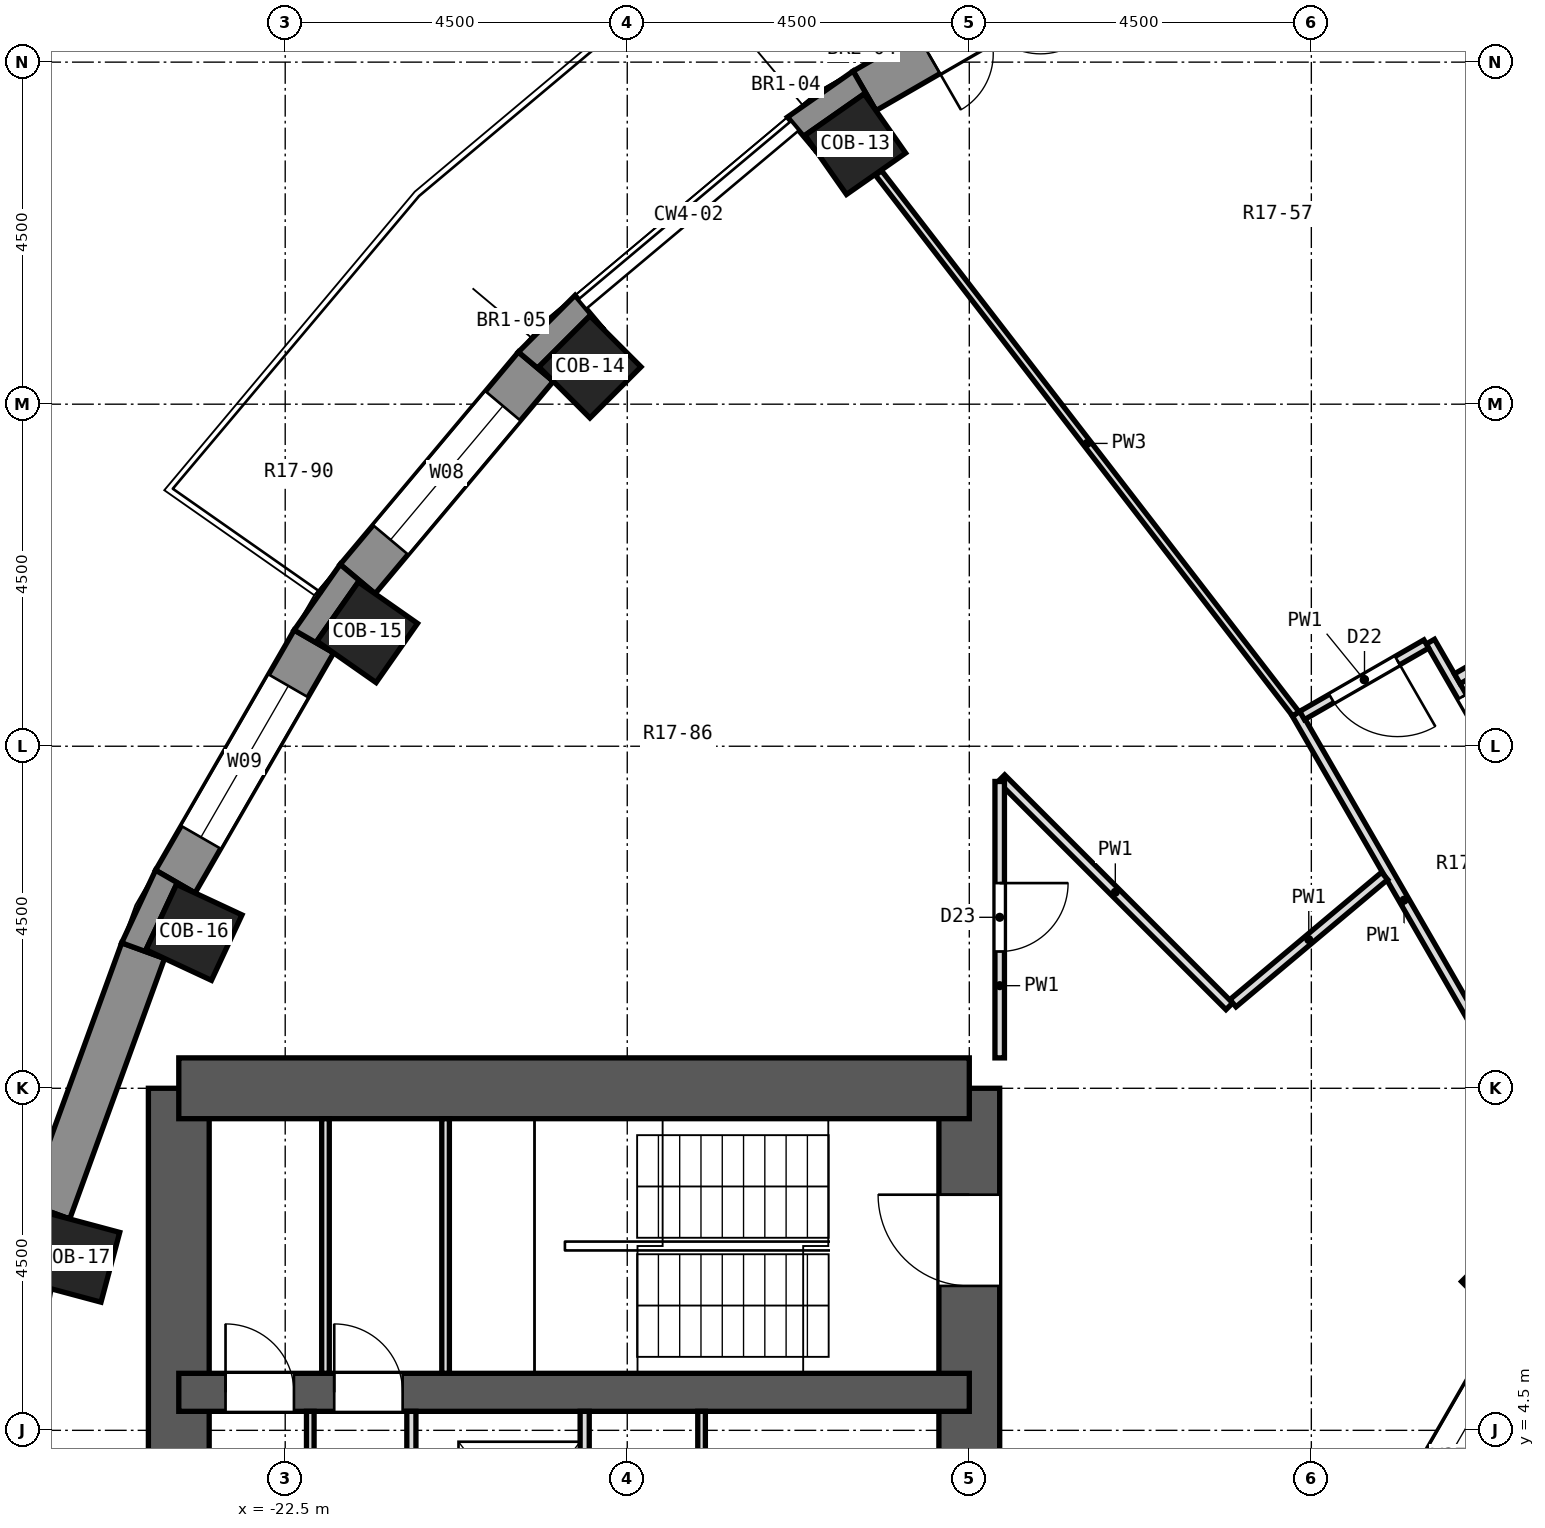
"""IFC4 building model, lengths in metres.
Left out: names, types, materials, properties, quantities, classifications, styles, units other than length and angle.
Written with IfcOpenShell. Run it as: python <this file> out.ifc"""

import sys

from ifc_helpers import new_model, si_unit, direction, frame, frame_2d, origin, origin_2d, place, context, subcontext, project, spatial, polyline, rectangle, outline, extrude, element, fill, save


model = new_model("IFC4")
c1 = context("Model", 3, precision=1e-05, world=origin(), true_north=direction((0.0, 1.0)))
c2 = subcontext(c1, "Body", "Model", "MODEL_VIEW")
j1 = project(units=[si_unit("LENGTHUNIT", "METRE"), si_unit("PLANEANGLEUNIT", "RADIAN")], contexts=[c1])
p1 = place(None, origin())
s1 = spatial("IfcSite", under=j1, at=p1, CompositionType="ELEMENT")
p2 = place(p1, origin())
s2 = spatial("IfcBuilding", under=s1, at=p2, CompositionType="ELEMENT")
p3 = place(p2, frame((0.0, 0.0, 91.9)))
s3 = spatial("IfcBuildingStorey", under=s2, at=p3, CompositionType="ELEMENT", Elevation=91.9)
for number, where, z_axis, x_axis in (
    (1, (-14.999, 21.421, 0.0), (0.0, 0.0, 1.0), (-0.574, 0.819, 0.0)),
    (2, (-18.491, 18.491, 0.0), (0.0, 0.0, 1.0), (-0.707, 0.707, 0.0)),
    (3, (-21.421, 14.999, 0.0), (0.0, 0.0, 1.0), (-0.819, 0.574, 0.0)),
    (4, (-23.7, 11.052, 0.0), (0.0, 0.0, 1.0), (-0.906, 0.423, 0.0)),
    (5, (-25.259, 6.768, 0.0), (0.0, 0.0, 1.0), (-0.966, 0.259, 0.0)),
):
    element("IfcColumn", number, at=place(p3, frame(where, z_axis=z_axis, x_axis=x_axis)), inside=s3, PredefinedType="COLUMN", context=c2, shape_type="SweptSolid", body=[
        extrude(rectangle(XDim=0.95, YDim=0.95, at=origin_2d()), origin(), (0.0, 0.0, 1.0), 3.3),
    ])
p4 = place(p3, frame((-6.458, 6.458, 0.0), z_axis=(0.0, 0.0, 1.0), x_axis=(-0.707106781187, 0.707106781187, 0.0)))
e6 = element("IfcColumn", 6, at=p4, inside=s3, PredefinedType="COLUMN", context=c2, shape_type="SweptSolid", body=[
    extrude(rectangle(XDim=0.8, YDim=0.8, at=origin_2d()), origin(), (0.0, 0.0, 1.0), 3.3),
])
p5 = place(p3, frame((-13.5, -9.0, 0.0), z_axis=(0.0, 0.0, 1.0), x_axis=(0.0, 1.0, 0.0)))
e7 = element("IfcWall", 7, at=p5, inside=s3, PredefinedType="SHEAR", context=c2, shape_type="SweptSolid", body=[
    extrude(rectangle(XDim=18.0, YDim=0.8, at=frame_2d((9.0, 0.0))), origin(), (0.0, 0.0, 1.0), 3.3),
])
p6 = place(p5, frame((15.4, 0.0, 0.0)))
e8 = element("IfcOpeningElement", 8, at=p6, cuts=e7, PredefinedType="OPENING", context=c2, shape_type="SweptSolid", body=[
    extrude(rectangle(XDim=1.2, YDim=2.1, at=frame_2d((0.6, 1.05))), frame((0.0, 0.412, 0.0), z_axis=(0.0, -1.0, 0.0), x_axis=(1.0, 0.0, 0.0)), (0.0, 0.0, 1.0), 0.824),
])
p7 = place(p5, frame((1.4, 0.0, 0.0)))
e9 = element("IfcOpeningElement", 9, at=p7, cuts=e7, PredefinedType="OPENING", context=c2, shape_type="SweptSolid", body=[
    extrude(rectangle(XDim=1.2, YDim=2.1, at=frame_2d((0.6, 1.05))), frame((0.0, 0.412, 0.0), z_axis=(0.0, -1.0, 0.0), x_axis=(1.0, 0.0, 0.0)), (0.0, 0.0, 1.0), 0.824),
])
p8 = place(p5, frame((7.5, 0.0, 0.0)))
e10 = element("IfcOpeningElement", 10, at=p8, cuts=e7, PredefinedType="OPENING", context=c2, shape_type="SweptSolid", body=[
    extrude(rectangle(XDim=3.0, YDim=2.4, at=frame_2d((1.5, 1.2))), frame((0.0, 0.412, 0.0), z_axis=(0.0, -1.0, 0.0), x_axis=(1.0, 0.0, 0.0)), (0.0, 0.0, 1.0), 0.824),
])
p9 = place(p3, frame((-23.9, -9.0, 0.0), z_axis=(0.0, 0.0, 1.0), x_axis=(0.0, 1.0, 0.0)))
e11 = element("IfcWall", 11, at=p9, inside=s3, PredefinedType="SHEAR", context=c2, shape_type="SweptSolid", body=[
    extrude(rectangle(XDim=18.0, YDim=0.8, at=frame_2d((9.0, 0.0))), origin(), (0.0, 0.0, 1.0), 3.3),
])
p10 = place(p3, frame((-13.5, 9.0, 0.0), z_axis=(0.0, 0.0, 1.0), x_axis=(-1.0, 0.0, 0.0)))
e12 = element("IfcWall", 12, at=p10, inside=s3, PredefinedType="SHEAR", context=c2, shape_type="SweptSolid", body=[
    extrude(rectangle(XDim=10.4, YDim=0.8, at=frame_2d((5.2, 0.0))), origin(), (0.0, 0.0, 1.0), 3.3),
])
p11 = place(p3, frame((-13.5, 5.0, 0.0), z_axis=(0.0, 0.0, 1.0), x_axis=(-1.0, 0.0, 0.0)))
e13 = element("IfcWall", 13, at=p11, inside=s3, PredefinedType="SHEAR", context=c2, shape_type="SweptSolid", body=[
    extrude(rectangle(XDim=10.4, YDim=0.5, at=frame_2d((5.2, 0.0))), origin(), (0.0, 0.0, 1.0), 3.3),
])
p12 = place(p11, frame((7.455, 0.0, 0.0)))
e14 = element("IfcOpeningElement", 14, at=p12, cuts=e13, PredefinedType="OPENING", context=c2, shape_type="SweptSolid", body=[
    extrude(rectangle(XDim=0.9, YDim=2.1, at=frame_2d((0.45, 1.05))), frame((0.0, 0.262, 0.0), z_axis=(0.0, -1.0, 0.0), x_axis=(1.0, 0.0, 0.0)), (0.0, 0.0, 1.0), 0.524),
])
p13 = place(p11, frame((8.885, 0.0, 0.0)))
e15 = element("IfcOpeningElement", 15, at=p13, cuts=e13, PredefinedType="OPENING", context=c2, shape_type="SweptSolid", body=[
    extrude(rectangle(XDim=0.9, YDim=2.1, at=frame_2d((0.45, 1.05))), frame((0.0, 0.262, 0.0), z_axis=(0.0, -1.0, 0.0), x_axis=(1.0, 0.0, 0.0)), (0.0, 0.0, 1.0), 0.524),
])
p14 = place(p3, frame((-11.719, 23.946, 0.0), z_axis=(0.0, 0.0, 1.0), x_axis=(-0.866051847062, -0.499954196102, 0.0)))
e16 = element("IfcWall", 16, at=p14, inside=s3, PredefinedType="SOLIDWALL", context=c2, shape_type="SweptSolid", body=[
    extrude(rectangle(XDim=3.648, YDim=0.6, at=frame_2d((1.824, 0.0))), origin(), (0.0, 0.0, 1.0), 2.8),
])
p15 = place(p14, frame((0.974, 0.0, 0.0)))
e17 = element("IfcOpeningElement", 17, at=p15, cuts=e16, PredefinedType="OPENING", context=c2, shape_type="SweptSolid", body=[
    extrude(rectangle(XDim=1.7, YDim=2.4, at=frame_2d((0.85, 1.2))), frame((0.0, 0.312, 0.0), z_axis=(0.0, -1.0, 0.0), x_axis=(1.0, 0.0, 0.0)), (0.0, 0.0, 1.0), 0.624),
])
p16 = place(p3, frame((-19.202, 18.494, 0.0), z_axis=(0.0, 0.0, 1.0), x_axis=(-0.642774476932, -0.766055462616, 0.0)))
e18 = element("IfcWall", 18, at=p16, inside=s3, PredefinedType="SOLIDWALL", context=c2, shape_type="SweptSolid", body=[
    extrude(rectangle(XDim=3.648, YDim=0.6, at=frame_2d((1.824, 0.0))), origin(), (0.0, 0.0, 1.0), 2.8),
])
p17 = place(p16, frame((0.674, 0.0, 0.9)))
e19 = element("IfcOpeningElement", 19, at=p17, cuts=e18, PredefinedType="OPENING", context=c2, shape_type="SweptSolid", body=[
    extrude(rectangle(XDim=2.3, YDim=1.8, at=frame_2d((1.15, 0.9))), frame((0.0, 0.312, 0.0), z_axis=(0.0, -1.0, 0.0), x_axis=(1.0, 0.0, 0.0)), (0.0, 0.0, 1.0), 0.624),
])
p18 = place(p3, frame((-22.122, 14.878, 0.0), z_axis=(0.0, 0.0, 1.0), x_axis=(-0.499954196102, -0.866051847062, 0.0)))
e20 = element("IfcWall", 20, at=p18, inside=s3, PredefinedType="SOLIDWALL", context=c2, shape_type="SweptSolid", body=[
    extrude(rectangle(XDim=3.648, YDim=0.6, at=frame_2d((1.824, 0.0))), origin(), (0.0, 0.0, 1.0), 2.8),
])
p19 = place(p18, frame((0.674, 0.0, 0.9)))
e21 = element("IfcOpeningElement", 21, at=p19, cuts=e20, PredefinedType="OPENING", context=c2, shape_type="SweptSolid", body=[
    extrude(rectangle(XDim=2.3, YDim=1.8, at=frame_2d((1.15, 0.9))), frame((0.0, 0.312, 0.0), z_axis=(0.0, -1.0, 0.0), x_axis=(1.0, 0.0, 0.0)), (0.0, 0.0, 1.0), 0.624),
])
p20 = place(p3, frame((-24.369, 10.811, 0.0), z_axis=(0.0, 0.0, 1.0), x_axis=(-0.341990236633, -0.939703505393, 0.0)))
e22 = element("IfcWall", 22, at=p20, inside=s3, PredefinedType="SOLIDWALL", context=c2, shape_type="SweptSolid", body=[
    extrude(rectangle(XDim=3.648, YDim=0.6, at=frame_2d((1.824, 0.0))), origin(), (0.0, 0.0, 1.0), 2.8),
])
p21 = place(p3, origin())
e23 = element("IfcWall", 23, at=p21, inside=s3, PredefinedType="SOLIDWALL", context=c2, shape_type="SweptSolid", body=[
    extrude(outline(polyline([(-15.892, 21.777), (-15.506, 21.317), (-15.661, 21.538), (-14.882, 22.083), (-14.728, 21.862), (-15.028, 22.382), (-15.892, 21.777)])), origin(), (0.0, 0.0, 1.0), 2.8),
])
p22 = place(p3, origin())
e24 = element("IfcWall", 24, at=p22, inside=s3, PredefinedType="SOLIDWALL", context=c2, shape_type="SweptSolid", body=[
    extrude(outline(polyline([(-18.686, 19.432), (-19.432, 18.686), (-18.972, 18.301), (-19.163, 18.491), (-18.491, 19.163), (-18.301, 18.972), (-18.686, 19.432)])), origin(), (0.0, 0.0, 1.0), 2.8),
])
p23 = place(p3, origin())
e25 = element("IfcWall", 25, at=p23, inside=s3, PredefinedType="SOLIDWALL", context=c2, shape_type="SweptSolid", body=[
    extrude(outline(polyline([(-22.382, 15.028), (-21.862, 14.728), (-22.083, 14.882), (-21.538, 15.661), (-21.317, 15.506), (-21.777, 15.892), (-22.382, 15.028)])), origin(), (0.0, 0.0, 1.0), 2.8),
])
p24 = place(p3, origin())
e26 = element("IfcWall", 26, at=p24, inside=s3, PredefinedType="SOLIDWALL", context=c2, shape_type="SweptSolid", body=[
    extrude(outline(polyline([(-24.651, 10.913), (-24.087, 10.708), (-24.331, 10.822), (-23.93, 11.683), (-23.686, 11.569), (-24.206, 11.869), (-24.651, 10.913)])), origin(), (0.0, 0.0, 1.0), 2.8),
])
p25 = place(p3, origin())
e27 = element("IfcWall", 27, at=p25, inside=s3, PredefinedType="SOLIDWALL", context=c2, shape_type="SweptSolid", body=[
    extrude(outline(polyline([(-25.899, 7.486), (-26.172, 6.467), (-25.581, 6.363), (-25.841, 6.432), (-25.595, 7.35), (-25.335, 7.28), (-25.899, 7.486)])), origin(), (0.0, 0.0, 1.0), 2.8),
])
p26 = place(p3, frame((-6.251, 5.773, 0.0), z_axis=(0.0, 0.0, 1.0), x_axis=(-0.499964958637, -0.86604563398, 0.0)))
e28 = element("IfcWall", 28, at=p26, inside=s3, PredefinedType="SOLIDWALL", context=c2, shape_type="SweptSolid", body=[
    extrude(rectangle(XDim=3.747, YDim=0.6, at=frame_2d((1.874, 0.0))), origin(), (0.0, 0.0, 1.0), 2.8),
])
p27 = place(p26, frame((0.674, 0.0, 0.9)))
e29 = element("IfcOpeningElement", 29, at=p27, cuts=e28, PredefinedType="OPENING", context=c2, shape_type="SweptSolid", body=[
    extrude(rectangle(XDim=2.4, YDim=1.8, at=frame_2d((1.2, 0.9))), frame((0.0, 0.312, 0.0), z_axis=(0.0, -1.0, 0.0), x_axis=(1.0, 0.0, 0.0)), (0.0, 0.0, 1.0), 0.624),
])
p28 = place(p3, frame((-9.197, 13.93, 0.0), z_axis=(0.0, 0.0, 1.0), x_axis=(0.499811918813, -0.86613396528, 0.0)))
e30 = element("IfcWall", 30, at=p28, inside=s3, PredefinedType="PARTITIONING", context=c2, shape_type="SweptSolid", body=[
    extrude(rectangle(XDim=5.67, YDim=0.125, at=frame_2d((2.835, 0.0))), origin(), (0.0, 0.0, 1.0), 2.8),
])
p29 = place(p3, frame((-7.434, 14.876, 0.0), z_axis=(0.0, 0.0, 1.0), x_axis=(0.499750096908, -0.866169637335, 0.0)))
e31 = element("IfcWall", 31, at=p29, inside=s3, PredefinedType="PARTITIONING", context=c2, shape_type="SweptSolid", body=[
    extrude(rectangle(XDim=5.607, YDim=0.125, at=frame_2d((2.803, 0.0))), origin(), (0.0, 0.0, 1.0), 2.8),
])
p30 = place(p29, frame((0.837, 0.0, 0.0)))
e32 = element("IfcOpeningElement", 32, at=p30, cuts=e31, PredefinedType="OPENING", context=c2, shape_type="SweptSolid", body=[
    extrude(rectangle(XDim=1.0, YDim=2.1, at=frame_2d((0.5, 1.05))), frame((0.0, 0.074, 0.0), z_axis=(0.0, -1.0, 0.0), x_axis=(1.0, 0.0, 0.0)), (0.0, 0.0, 1.0), 0.149),
])
p31 = place(p3, frame((-14.694, 21.042, 0.0), z_axis=(0.0, 0.0, 1.0), x_axis=(0.610804913832, -0.79178112963, 0.0)))
e33 = element("IfcWall", 33, at=p31, inside=s3, PredefinedType="PARTITIONING", context=c2, shape_type="SweptSolid", body=[
    extrude(rectangle(XDim=8.989, YDim=0.1, at=frame_2d((4.494, 0.0))), origin(), (0.0, 0.0, 1.0), 2.8),
])
p32 = place(p3, frame((-13.079, 13.079, 0.0), z_axis=(0.0, 0.0, 1.0), x_axis=(0.707106781187, -0.707106781187, 0.0)))
e34 = element("IfcWall", 34, at=p32, inside=s3, PredefinedType="PARTITIONING", context=c2, shape_type="SweptSolid", body=[
    extrude(rectangle(XDim=4.242, YDim=0.125, at=frame_2d((2.121, 0.0))), origin(), (0.0, 0.0, 1.0), 2.8),
])
p33 = place(p3, frame((-9.122, 13.904, 0.0), z_axis=(0.0, 0.0, 1.0), x_axis=(0.866620759959, 0.498967392128, 0.0)))
e35 = element("IfcWall", 35, at=p33, inside=s3, PredefinedType="PARTITIONING", context=c2, shape_type="SweptSolid", body=[
    extrude(rectangle(XDim=1.885, YDim=0.125, at=frame_2d((0.943, 0.0))), origin(), (0.0, 0.0, 1.0), 2.8),
])
p34 = place(p33, frame((0.448, 0.0, 0.0)))
e36 = element("IfcOpeningElement", 36, at=p34, cuts=e35, PredefinedType="OPENING", context=c2, shape_type="SweptSolid", body=[
    extrude(rectangle(XDim=1.0, YDim=2.1, at=frame_2d((0.5, 1.05))), frame((0.0, 0.074, 0.0), z_axis=(0.0, -1.0, 0.0), x_axis=(1.0, 0.0, 0.0)), (0.0, 0.0, 1.0), 0.149),
])
p35 = place(p3, frame((-7.08, 14.387, 0.0), z_axis=(0.0, 0.0, 1.0), x_axis=(0.865957178428, 0.500118151169, 0.0)))
e37 = element("IfcWall", 37, at=p35, inside=s3, PredefinedType="PARTITIONING", context=c2, shape_type="SweptSolid", body=[
    extrude(rectangle(XDim=3.24, YDim=0.15, at=frame_2d((1.62, 0.0))), origin(), (0.0, 0.0, 1.0), 2.8),
])
p36 = place(p3, frame((-10.031, 10.119, 0.0), z_axis=(0.0, 0.0, 1.0), x_axis=(0.766096242005, 0.642725873126, 0.0)))
e38 = element("IfcWall", 38, at=p36, inside=s3, PredefinedType="PARTITIONING", context=c2, shape_type="SweptSolid", body=[
    extrude(rectangle(XDim=2.604, YDim=0.125, at=frame_2d((1.302, 0.0))), origin(), (0.0, 0.0, 1.0), 2.8),
])
p37 = place(p3, frame((-13.1, 9.4, 0.0), z_axis=(0.0, 0.0, 1.0), x_axis=(0.0, 1.0, 0.0)))
e39 = element("IfcWall", 39, at=p37, inside=s3, PredefinedType="PARTITIONING", context=c2, shape_type="SweptSolid", body=[
    extrude(rectangle(XDim=3.637, YDim=0.125, at=frame_2d((1.818, 0.0))), origin(), (0.0, 0.0, 1.0), 2.8),
])
p38 = place(p37, frame((1.399, 0.0, 0.0)))
e40 = element("IfcOpeningElement", 40, at=p38, cuts=e39, PredefinedType="OPENING", context=c2, shape_type="SweptSolid", body=[
    extrude(rectangle(XDim=0.9, YDim=2.1, at=frame_2d((0.45, 1.05))), frame((0.0, 0.074, 0.0), z_axis=(0.0, -1.0, 0.0), x_axis=(1.0, 0.0, 0.0)), (0.0, 0.0, 1.0), 0.149),
])
p39 = place(p3, frame((-17.022, 2.25, 0.0), z_axis=(0.0, 0.0, 1.0), x_axis=(0.0, 1.0, 0.0)))
e41 = element("IfcWall", 41, at=p39, inside=s3, PredefinedType="PARTITIONING", context=c2, shape_type="SweptSolid", body=[
    extrude(rectangle(XDim=2.5, YDim=0.1, at=frame_2d((1.25, 0.0))), origin(), (0.0, 0.0, 1.0), 2.8),
])
for number, where, z_axis, x_axis in (
    (42, (-18.56, 2.25, 0.0), (0.0, 0.0, 1.0), (0.0, 1.0, 0.0)),
    (43, (-20.84, 2.25, 0.0), (0.0, 0.0, 1.0), (0.0, 1.0, 0.0)),
):
    element("IfcWall", number, at=place(p3, frame(where, z_axis=z_axis, x_axis=x_axis)), inside=s3, PredefinedType="PARTITIONING", context=c2, shape_type="SweptSolid", body=[
        extrude(rectangle(XDim=2.5, YDim=0.12, at=frame_2d((1.25, 0.0))), origin(), (0.0, 0.0, 1.0), 2.8),
    ])
p40 = place(p3, frame((-22.17, 2.25, 0.0), z_axis=(0.0, 0.0, 1.0), x_axis=(0.0, 1.0, 0.0)))
e44 = element("IfcWall", 44, at=p40, inside=s3, PredefinedType="PARTITIONING", context=c2, shape_type="SweptSolid", body=[
    extrude(rectangle(XDim=2.5, YDim=0.1, at=frame_2d((1.25, 0.0))), origin(), (0.0, 0.0, 1.0), 2.8),
])
for number, where, z_axis, x_axis in (
    (45, (-20.39, 5.25, 0.0), (0.0, 0.0, 1.0), (0.0, 1.0, 0.0)),
    (46, (-21.97, 5.25, 0.0), (0.0, 0.0, 1.0), (0.0, 1.0, 0.0)),
):
    element("IfcWall", number, at=place(p3, frame(where, z_axis=z_axis, x_axis=x_axis)), inside=s3, PredefinedType="PARTITIONING", context=c2, shape_type="SweptSolid", body=[
        extrude(rectangle(XDim=3.35, YDim=0.1, at=frame_2d((1.675, 0.0))), origin(), (0.0, 0.0, 1.0), 2.8),
    ])
p41 = place(p15, origin())
e47 = element("IfcDoor", 47, at=p41, inside=s3, OperationType="DOUBLE_DOOR_SINGLE_SWING", PredefinedType="DOOR", context=c2, shape_type="SweptSolid", body=[
    extrude(rectangle(XDim=1.7, YDim=2.4, at=frame_2d((0.85, 1.2))), frame((0.0, 0.125, 0.0), z_axis=(0.0, -1.0, 0.0), x_axis=(1.0, 0.0, 0.0)), (0.0, 0.0, 1.0), 0.05),
])
fill(e17, e47)
p42 = place(p17, origin())
e48 = element("IfcWindow", 48, at=p42, inside=s3, PartitioningType="SINGLE_PANEL", PredefinedType="WINDOW", context=c2, shape_type="SweptSolid", body=[
    extrude(rectangle(XDim=2.3, YDim=1.8, at=frame_2d((1.15, 0.9))), frame((0.0, 0.18, 0.0), z_axis=(0.0, -1.0, 0.0), x_axis=(1.0, 0.0, 0.0)), (0.0, 0.0, 1.0), 0.06),
])
fill(e19, e48)
p43 = place(p19, origin())
e49 = element("IfcWindow", 49, at=p43, inside=s3, PartitioningType="SINGLE_PANEL", PredefinedType="WINDOW", context=c2, shape_type="SweptSolid", body=[
    extrude(rectangle(XDim=2.3, YDim=1.8, at=frame_2d((1.15, 0.9))), frame((0.0, 0.18, 0.0), z_axis=(0.0, -1.0, 0.0), x_axis=(1.0, 0.0, 0.0)), (0.0, 0.0, 1.0), 0.06),
])
fill(e21, e49)
p44 = place(p27, origin())
e50 = element("IfcWindow", 50, at=p44, inside=s3, PartitioningType="SINGLE_PANEL", PredefinedType="WINDOW", context=c2, shape_type="SweptSolid", body=[
    extrude(rectangle(XDim=2.4, YDim=1.8, at=frame_2d((1.2, 0.9))), frame((0.0, -0.12, 0.0), z_axis=(0.0, -1.0, 0.0), x_axis=(1.0, 0.0, 0.0)), (0.0, 0.0, 1.0), 0.06),
])
fill(e29, e50)
p45 = place(p30, origin())
e51 = element("IfcDoor", 51, at=p45, inside=s3, OperationType="SINGLE_SWING_LEFT", PredefinedType="DOOR", context=c2, shape_type="SweptSolid", body=[
    extrude(rectangle(XDim=1.0, YDim=2.1, at=frame_2d((0.5, 1.05))), frame((0.0, 0.025, 0.0), z_axis=(0.0, -1.0, 0.0), x_axis=(1.0, 0.0, 0.0)), (0.0, 0.0, 1.0), 0.05),
])
fill(e32, e51)
p46 = place(p34, frame((1.0, 0.0, 0.0), z_axis=(0.0, 0.0, 1.0), x_axis=(-1.0, 0.0, 0.0)))
e52 = element("IfcDoor", 52, at=p46, inside=s3, OperationType="SINGLE_SWING_LEFT", PredefinedType="DOOR", context=c2, shape_type="SweptSolid", body=[
    extrude(rectangle(XDim=1.0, YDim=2.1, at=frame_2d((0.5, 1.05))), frame((0.0, 0.025, 0.0), z_axis=(0.0, -1.0, 0.0), x_axis=(1.0, 0.0, 0.0)), (0.0, 0.0, 1.0), 0.05),
])
fill(e36, e52)
p47 = place(p38, frame((0.9, 0.0, 0.0), z_axis=(0.0, 0.0, 1.0), x_axis=(-1.0, 0.0, 0.0)))
e53 = element("IfcDoor", 53, at=p47, inside=s3, OperationType="SINGLE_SWING_LEFT", PredefinedType="DOOR", context=c2, shape_type="SweptSolid", body=[
    extrude(rectangle(XDim=0.9, YDim=2.1, at=frame_2d((0.45, 1.05))), frame((0.0, 0.025, 0.0), z_axis=(0.0, -1.0, 0.0), x_axis=(1.0, 0.0, 0.0)), (0.0, 0.0, 1.0), 0.05),
])
fill(e40, e53)
p48 = place(p12, frame((0.9, 0.0, 0.0), z_axis=(0.0, 0.0, 1.0), x_axis=(-1.0, 0.0, 0.0)))
e54 = element("IfcDoor", 54, at=p48, inside=s3, OperationType="SINGLE_SWING_LEFT", PredefinedType="DOOR", context=c2, shape_type="SweptSolid", body=[
    extrude(rectangle(XDim=0.9, YDim=2.1, at=frame_2d((0.45, 1.05))), frame((0.0, 0.025, 0.0), z_axis=(0.0, -1.0, 0.0), x_axis=(1.0, 0.0, 0.0)), (0.0, 0.0, 1.0), 0.05),
])
fill(e14, e54)
p49 = place(p13, frame((0.9, 0.0, 0.0), z_axis=(0.0, 0.0, 1.0), x_axis=(-1.0, 0.0, 0.0)))
e55 = element("IfcDoor", 55, at=p49, inside=s3, OperationType="SINGLE_SWING_LEFT", PredefinedType="DOOR", context=c2, shape_type="SweptSolid", body=[
    extrude(rectangle(XDim=0.9, YDim=2.1, at=frame_2d((0.45, 1.05))), frame((0.0, 0.025, 0.0), z_axis=(0.0, -1.0, 0.0), x_axis=(1.0, 0.0, 0.0)), (0.0, 0.0, 1.0), 0.05),
])
fill(e15, e55)
p50 = place(p6, origin())
e56 = element("IfcDoor", 56, at=p50, inside=s3, OperationType="SINGLE_SWING_RIGHT", PredefinedType="DOOR", context=c2, shape_type="SweptSolid", body=[
    extrude(rectangle(XDim=1.2, YDim=2.1, at=frame_2d((0.6, 1.05))), frame((0.0, 0.025, 0.0), z_axis=(0.0, -1.0, 0.0), x_axis=(1.0, 0.0, 0.0)), (0.0, 0.0, 1.0), 0.05),
])
fill(e8, e56)
save(model, sys.argv[1])
